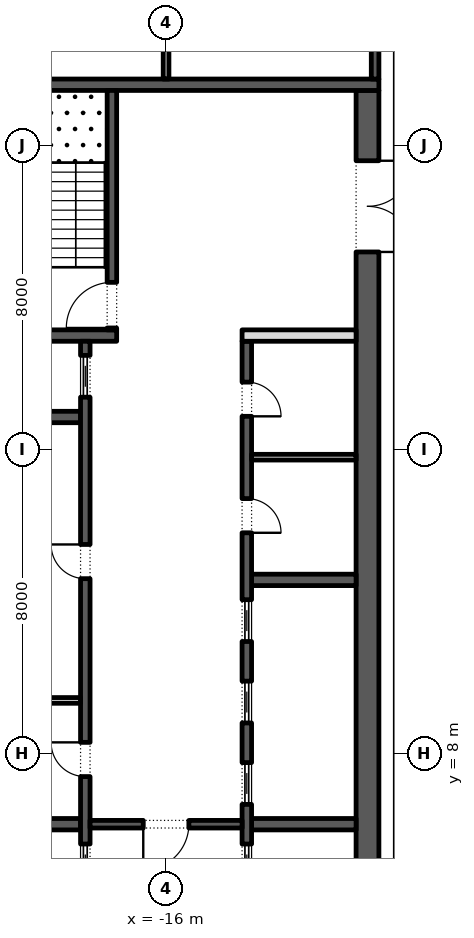
"""IFC4 building model, lengths in metres.
Left out: names, types, materials, properties, quantities, classifications, styles, units other than length and angle.
Written with IfcOpenShell. Run it as: python <this file> out.ifc"""

import sys

from ifc_helpers import new_model, si_unit, direction, frame, frame_2d, origin, place, context, subcontext, project, spatial, rectangle, extrude, element, fill, save


model = new_model("IFC4")
c1 = context("Model", 3, precision=1e-05, world=origin(), true_north=direction((0.0, 1.0)))
c2 = subcontext(c1, "Body", "Model", "MODEL_VIEW")
j1 = project(units=[si_unit("LENGTHUNIT", "METRE"), si_unit("PLANEANGLEUNIT", "RADIAN")], contexts=[c1])
p1 = place(None, origin())
s1 = spatial("IfcSite", under=j1, at=p1, CompositionType="ELEMENT")
p2 = place(p1, origin())
s2 = spatial("IfcBuilding", under=s1, at=p2, CompositionType="ELEMENT")
p3 = place(p2, frame((0.0, 0.0, 272.4)))
s3 = spatial("IfcBuildingStorey", under=s2, at=p3, CompositionType="ELEMENT", Elevation=272.4)
p4 = place(p3, frame((-10.7, -2.45, 0.0), z_axis=(0.0, 0.0, 1.0), x_axis=(0.0, 1.0, 0.0)))
e1 = element("IfcWall", 1, at=p4, inside=s3, PredefinedType="SHEAR", context=c2, shape_type="SweptSolid", body=[
    extrude(rectangle(XDim=27.9, YDim=0.6, at=frame_2d((13.95, 0.0))), origin(), (0.0, 0.0, 1.0), 4.0),
])
p5 = place(p4, frame((23.65, 0.0, 0.0)))
e2 = element("IfcOpeningElement", 2, at=p5, cuts=e1, PredefinedType="OPENING", context=c2, shape_type="SweptSolid", body=[
    extrude(rectangle(XDim=2.4, YDim=2.1, at=frame_2d((1.2, 1.05))), frame((0.0, 0.31, 0.0), z_axis=(0.0, -1.0, 0.0), x_axis=(1.0, 0.0, 0.0)), (0.0, 0.0, 1.0), 0.62),
])
p6 = place(p4, frame((1.087, 0.0, 0.0)))
e3 = element("IfcOpeningElement", 3, at=p6, cuts=e1, PredefinedType="OPENING", context=c2, shape_type="SweptSolid", body=[
    extrude(rectangle(XDim=0.9, YDim=2.1, at=frame_2d((0.45, 1.05))), frame((0.0, 0.31, 0.0), z_axis=(0.0, -1.0, 0.0), x_axis=(1.0, 0.0, 0.0)), (0.0, 0.0, 1.0), 0.62),
])
p7 = place(p4, frame((4.262, 0.0, 0.0)))
e4 = element("IfcOpeningElement", 4, at=p7, cuts=e1, PredefinedType="OPENING", context=c2, shape_type="SweptSolid", body=[
    extrude(rectangle(XDim=1.0, YDim=2.1, at=frame_2d((0.5, 1.05))), frame((0.0, 0.31, 0.0), z_axis=(0.0, -1.0, 0.0), x_axis=(1.0, 0.0, 0.0)), (0.0, 0.0, 1.0), 0.62),
])
p8 = place(p3, frame((-21.6, 25.6, 0.0), z_axis=(0.0, 0.0, 1.0), x_axis=(1.0, 0.0, 0.0)))
e5 = element("IfcWall", 5, at=p8, inside=s3, PredefinedType="SHEAR", context=c2, shape_type="SweptSolid", body=[
    extrude(rectangle(XDim=11.2, YDim=0.3, at=frame_2d((5.6, 0.0))), origin(), (0.0, 0.0, 1.0), 4.0),
])
p9 = place(p3, frame((-21.0, 19.0, 0.0), z_axis=(0.0, 0.0, 1.0), x_axis=(1.0, 0.0, 0.0)))
e6 = element("IfcWall", 6, at=p9, inside=s3, PredefinedType="SHEAR", context=c2, shape_type="SweptSolid", body=[
    extrude(rectangle(XDim=3.7, YDim=0.3, at=frame_2d((1.85, 0.0))), origin(), (0.0, 0.0, 1.0), 4.0),
])
p10 = place(p3, frame((-17.425, 19.15, 0.0), z_axis=(0.0, 0.0, 1.0), x_axis=(0.0, 1.0, 0.0)))
e7 = element("IfcWall", 7, at=p10, inside=s3, PredefinedType="SHEAR", context=c2, shape_type="SweptSolid", body=[
    extrude(rectangle(XDim=6.3, YDim=0.25, at=frame_2d((3.15, 0.0))), origin(), (0.0, 0.0, 1.0), 4.0),
])
p11 = place(p10, frame((0.05, 0.0, 0.0)))
e8 = element("IfcOpeningElement", 8, at=p11, cuts=e7, PredefinedType="OPENING", context=c2, shape_type="SweptSolid", body=[
    extrude(rectangle(XDim=1.2, YDim=2.1, at=frame_2d((0.6, 1.05))), frame((0.0, 0.135, 0.0), z_axis=(0.0, -1.0, 0.0), x_axis=(1.0, 0.0, 0.0)), (0.0, 0.0, 1.0), 0.27),
])
for number, where, z_axis, x_axis in (
    (9, (-21.0, 6.143, 0.0), (0.0, 0.0, 1.0), (1.0, 0.0, 0.0)),
    (10, (-21.0, 16.857, 0.0), (0.0, 0.0, 1.0), (1.0, 0.0, 0.0)),
):
    element("IfcWall", number, at=place(p3, frame(where, z_axis=z_axis, x_axis=x_axis)), inside=s3, PredefinedType="SHEAR", context=c2, shape_type="SweptSolid", body=[
        extrude(rectangle(XDim=2.75, YDim=0.3, at=frame_2d((1.375, 0.0))), origin(), (0.0, 0.0, 1.0), 4.0),
    ])
p12 = place(p3, frame((-18.125, 4.15, 0.0), z_axis=(0.0, 0.0, 1.0), x_axis=(0.0, 1.0, 0.0)))
e11 = element("IfcWall", 11, at=p12, inside=s3, PredefinedType="SHEAR", context=c2, shape_type="SweptSolid", body=[
    extrude(rectangle(XDim=14.7, YDim=0.25, at=frame_2d((7.35, 0.0))), origin(), (0.0, 0.0, 1.0), 4.0),
])
p13 = place(p12, frame((3.246, 0.0, 0.0)))
e12 = element("IfcOpeningElement", 12, at=p13, cuts=e11, PredefinedType="OPENING", context=c2, shape_type="SweptSolid", body=[
    extrude(rectangle(XDim=0.9, YDim=2.1, at=frame_2d((0.45, 1.05))), frame((0.0, 0.135, 0.0), z_axis=(0.0, -1.0, 0.0), x_axis=(1.0, 0.0, 0.0)), (0.0, 0.0, 1.0), 0.27),
])
p14 = place(p12, frame((8.454, 0.0, 0.0)))
e13 = element("IfcOpeningElement", 13, at=p14, cuts=e11, PredefinedType="OPENING", context=c2, shape_type="SweptSolid", body=[
    extrude(rectangle(XDim=0.9, YDim=2.1, at=frame_2d((0.45, 1.05))), frame((0.0, 0.135, 0.0), z_axis=(0.0, -1.0, 0.0), x_axis=(1.0, 0.0, 0.0)), (0.0, 0.0, 1.0), 0.27),
])
p15 = place(p12, frame((0.371, 0.0, 0.0)))
e14 = element("IfcOpeningElement", 14, at=p15, cuts=e11, PredefinedType="OPENING", context=c2, shape_type="SweptSolid", body=[
    extrude(rectangle(XDim=1.1, YDim=2.1, at=frame_2d((0.55, 1.05))), frame((0.0, 0.135, 0.0), z_axis=(0.0, -1.0, 0.0), x_axis=(1.0, 0.0, 0.0)), (0.0, 0.0, 1.0), 0.27),
])
p16 = place(p12, frame((13.229, 0.0, 0.0)))
e15 = element("IfcOpeningElement", 15, at=p16, cuts=e11, PredefinedType="OPENING", context=c2, shape_type="SweptSolid", body=[
    extrude(rectangle(XDim=1.1, YDim=2.1, at=frame_2d((0.55, 1.05))), frame((0.0, 0.135, 0.0), z_axis=(0.0, -1.0, 0.0), x_axis=(1.0, 0.0, 0.0)), (0.0, 0.0, 1.0), 0.27),
])
p17 = place(p3, frame((-21.0, 9.4, 0.0), z_axis=(0.0, 0.0, 1.0), x_axis=(1.0, 0.0, 0.0)))
e16 = element("IfcWall", 16, at=p17, inside=s3, PredefinedType="PARTITIONING", context=c2, shape_type="SweptSolid", body=[
    extrude(rectangle(XDim=2.75, YDim=0.15, at=frame_2d((1.375, 0.0))), origin(), (0.0, 0.0, 1.0), 4.0),
])
for number, where, z_axis, x_axis in (
    (17, (-13.75, 6.143, 0.0), (0.0, 0.0, 1.0), (1.0, 0.0, 0.0)),
    (18, (-13.75, 12.571, 0.0), (0.0, 0.0, 1.0), (1.0, 0.0, 0.0)),
):
    element("IfcWall", number, at=place(p3, frame(where, z_axis=z_axis, x_axis=x_axis)), inside=s3, PredefinedType="SHEAR", context=c2, shape_type="SweptSolid", body=[
        extrude(rectangle(XDim=2.75, YDim=0.3, at=frame_2d((1.375, 0.0))), origin(), (0.0, 0.0, 1.0), 4.0),
    ])
p18 = place(p3, frame((-13.875, -2.45, 0.0), z_axis=(0.0, 0.0, 1.0), x_axis=(0.0, 1.0, 0.0)))
e19 = element("IfcWall", 19, at=p18, inside=s3, PredefinedType="SHEAR", context=c2, shape_type="SweptSolid", body=[
    extrude(rectangle(XDim=21.3, YDim=0.25, at=frame_2d((10.65, 0.0))), origin(), (0.0, 0.0, 1.0), 4.0),
])
p19 = place(p18, frame((16.261, 0.0, 0.0)))
e20 = element("IfcOpeningElement", 20, at=p19, cuts=e19, PredefinedType="OPENING", context=c2, shape_type="SweptSolid", body=[
    extrude(rectangle(XDim=0.9, YDim=2.1, at=frame_2d((0.45, 1.05))), frame((0.0, 0.135, 0.0), z_axis=(0.0, -1.0, 0.0), x_axis=(1.0, 0.0, 0.0)), (0.0, 0.0, 1.0), 0.27),
])
p20 = place(p18, frame((19.325, 0.0, 0.0)))
e21 = element("IfcOpeningElement", 21, at=p20, cuts=e19, PredefinedType="OPENING", context=c2, shape_type="SweptSolid", body=[
    extrude(rectangle(XDim=0.9, YDim=2.1, at=frame_2d((0.45, 1.05))), frame((0.0, 0.135, 0.0), z_axis=(0.0, -1.0, 0.0), x_axis=(1.0, 0.0, 0.0)), (0.0, 0.0, 1.0), 0.27),
])
p21 = place(p18, frame((6.971, 0.0, 0.0)))
e22 = element("IfcOpeningElement", 22, at=p21, cuts=e19, PredefinedType="OPENING", context=c2, shape_type="SweptSolid", body=[
    extrude(rectangle(XDim=1.1, YDim=2.1, at=frame_2d((0.55, 1.05))), frame((0.0, 0.135, 0.0), z_axis=(0.0, -1.0, 0.0), x_axis=(1.0, 0.0, 0.0)), (0.0, 0.0, 1.0), 0.27),
])
p22 = place(p18, frame((9.114, 0.0, 0.0)))
e23 = element("IfcOpeningElement", 23, at=p22, cuts=e19, PredefinedType="OPENING", context=c2, shape_type="SweptSolid", body=[
    extrude(rectangle(XDim=1.1, YDim=2.1, at=frame_2d((0.55, 1.05))), frame((0.0, 0.135, 0.0), z_axis=(0.0, -1.0, 0.0), x_axis=(1.0, 0.0, 0.0)), (0.0, 0.0, 1.0), 0.27),
])
p23 = place(p18, frame((11.257, 0.0, 0.0)))
e24 = element("IfcOpeningElement", 24, at=p23, cuts=e19, PredefinedType="OPENING", context=c2, shape_type="SweptSolid", body=[
    extrude(rectangle(XDim=1.1, YDim=2.1, at=frame_2d((0.55, 1.05))), frame((0.0, 0.135, 0.0), z_axis=(0.0, -1.0, 0.0), x_axis=(1.0, 0.0, 0.0)), (0.0, 0.0, 1.0), 0.27),
])
p24 = place(p18, frame((13.4, 0.0, 0.0)))
e25 = element("IfcOpeningElement", 25, at=p24, cuts=e19, PredefinedType="OPENING", context=c2, shape_type="SweptSolid", body=[
    extrude(rectangle(XDim=1.1, YDim=2.1, at=frame_2d((0.55, 1.05))), frame((0.0, 0.135, 0.0), z_axis=(0.0, -1.0, 0.0), x_axis=(1.0, 0.0, 0.0)), (0.0, 0.0, 1.0), 0.27),
])
p25 = place(p3, frame((-14.0, 19.0, 0.0), z_axis=(0.0, 0.0, 1.0), x_axis=(1.0, 0.0, 0.0)))
e26 = element("IfcWall", 26, at=p25, inside=s3, PredefinedType="PARTITIONING", context=c2, shape_type="SweptSolid", body=[
    extrude(rectangle(XDim=3.0, YDim=0.3, at=frame_2d((1.5, 0.0))), origin(), (0.0, 0.0, 1.0), 4.0),
])
p26 = place(p3, frame((-13.75, 15.8, 0.0), z_axis=(0.0, 0.0, 1.0), x_axis=(1.0, 0.0, 0.0)))
e27 = element("IfcWall", 27, at=p26, inside=s3, PredefinedType="PARTITIONING", context=c2, shape_type="SweptSolid", body=[
    extrude(rectangle(XDim=2.75, YDim=0.15, at=frame_2d((1.375, 0.0))), origin(), (0.0, 0.0, 1.0), 4.0),
])
p27 = place(p3, frame((-18.0, 6.143, 0.0), z_axis=(0.0, 0.0, 1.0), x_axis=(1.0, 0.0, 0.0)))
e28 = element("IfcWall", 28, at=p27, inside=s3, PredefinedType="SHEAR", context=c2, shape_type="SweptSolid", body=[
    extrude(rectangle(XDim=4.0, YDim=0.2, at=frame_2d((2.0, 0.0))), origin(), (0.0, 0.0, 1.0), 4.0),
])
p28 = place(p27, frame((1.4, 0.0, 0.0)))
e29 = element("IfcOpeningElement", 29, at=p28, cuts=e28, PredefinedType="OPENING", context=c2, shape_type="SweptSolid", body=[
    extrude(rectangle(XDim=1.2, YDim=2.1, at=frame_2d((0.6, 1.05))), frame((0.0, 0.11, 0.0), z_axis=(0.0, -1.0, 0.0), x_axis=(1.0, 0.0, 0.0)), (0.0, 0.0, 1.0), 0.22),
])
p29 = place(p3, frame((-10.5, 25.75, 0.0), z_axis=(0.0, 0.0, 1.0), x_axis=(0.0, 1.0, 0.0)))
e30 = element("IfcWall", 30, at=p29, inside=s3, PredefinedType="SHEAR", context=c2, shape_type="SweptSolid", body=[
    extrude(rectangle(XDim=4.75, YDim=0.2, at=frame_2d((2.375, 0.0))), origin(), (0.0, 0.0, 1.0), 4.0),
])
p30 = place(p29, frame((1.925, 0.0, 0.0)))
e31 = element("IfcOpeningElement", 31, at=p30, cuts=e30, PredefinedType="OPENING", context=c2, shape_type="SweptSolid", body=[
    extrude(rectangle(XDim=0.9, YDim=2.1, at=frame_2d((0.45, 1.05))), frame((0.0, 0.11, 0.0), z_axis=(0.0, -1.0, 0.0), x_axis=(1.0, 0.0, 0.0)), (0.0, 0.0, 1.0), 0.22),
])
p31 = place(p3, frame((-16.0, 25.75, 0.0), z_axis=(0.0, 0.0, 1.0), x_axis=(0.0, 1.0, 0.0)))
e32 = element("IfcWall", 32, at=p31, inside=s3, PredefinedType="PARTITIONING", context=c2, shape_type="SweptSolid", body=[
    extrude(rectangle(XDim=4.75, YDim=0.15, at=frame_2d((2.375, 0.0))), origin(), (0.0, 0.0, 1.0), 4.0),
])
p32 = place(p13, origin())
e33 = element("IfcDoor", 33, at=p32, inside=s3, OperationType="SINGLE_SWING_LEFT", PredefinedType="DOOR", context=c2, shape_type="SweptSolid", body=[
    extrude(rectangle(XDim=0.9, YDim=2.1, at=frame_2d((0.45, 1.05))), frame((0.0, 0.125, 0.0), z_axis=(0.0, -1.0, 0.0), x_axis=(1.0, 0.0, 0.0)), (0.0, 0.0, 1.0), 0.05),
])
fill(e12, e33)
p33 = place(p14, origin())
e34 = element("IfcDoor", 34, at=p33, inside=s3, OperationType="SINGLE_SWING_LEFT", PredefinedType="DOOR", context=c2, shape_type="SweptSolid", body=[
    extrude(rectangle(XDim=0.9, YDim=2.1, at=frame_2d((0.45, 1.05))), frame((0.0, 0.125, 0.0), z_axis=(0.0, -1.0, 0.0), x_axis=(1.0, 0.0, 0.0)), (0.0, 0.0, 1.0), 0.05),
])
fill(e13, e34)
p34 = place(p15, origin())
e35 = element("IfcDoor", 35, at=p34, inside=s3, OperationType="SLIDING_TO_LEFT", PredefinedType="DOOR", context=c2, shape_type="SweptSolid", body=[
    extrude(rectangle(XDim=1.1, YDim=2.1, at=frame_2d((0.55, 1.05))), frame((0.0, 0.025, 0.0), z_axis=(0.0, -1.0, 0.0), x_axis=(1.0, 0.0, 0.0)), (0.0, 0.0, 1.0), 0.05),
])
fill(e14, e35)
p35 = place(p16, origin())
e36 = element("IfcDoor", 36, at=p35, inside=s3, OperationType="SLIDING_TO_LEFT", PredefinedType="DOOR", context=c2, shape_type="SweptSolid", body=[
    extrude(rectangle(XDim=1.1, YDim=2.1, at=frame_2d((0.55, 1.05))), frame((0.0, 0.025, 0.0), z_axis=(0.0, -1.0, 0.0), x_axis=(1.0, 0.0, 0.0)), (0.0, 0.0, 1.0), 0.05),
])
fill(e15, e36)
p36 = place(p19, frame((0.9, -0.2, 0.0), z_axis=(0.0, 0.0, 1.0), x_axis=(-1.0, 0.0, 0.0)))
e37 = element("IfcDoor", 37, at=p36, inside=s3, OperationType="SINGLE_SWING_LEFT", PredefinedType="DOOR", context=c2, shape_type="SweptSolid", body=[
    extrude(rectangle(XDim=0.9, YDim=2.1, at=frame_2d((0.45, 1.05))), frame((0.0, -0.075, 0.0), z_axis=(0.0, -1.0, 0.0), x_axis=(1.0, 0.0, 0.0)), (0.0, 0.0, 1.0), 0.05),
])
fill(e20, e37)
p37 = place(p20, frame((0.9, -0.2, 0.0), z_axis=(0.0, 0.0, 1.0), x_axis=(-1.0, 0.0, 0.0)))
e38 = element("IfcDoor", 38, at=p37, inside=s3, OperationType="SINGLE_SWING_LEFT", PredefinedType="DOOR", context=c2, shape_type="SweptSolid", body=[
    extrude(rectangle(XDim=0.9, YDim=2.1, at=frame_2d((0.45, 1.05))), frame((0.0, -0.075, 0.0), z_axis=(0.0, -1.0, 0.0), x_axis=(1.0, 0.0, 0.0)), (0.0, 0.0, 1.0), 0.05),
])
fill(e21, e38)
p38 = place(p21, origin())
e39 = element("IfcDoor", 39, at=p38, inside=s3, OperationType="SLIDING_TO_LEFT", PredefinedType="DOOR", context=c2, shape_type="SweptSolid", body=[
    extrude(rectangle(XDim=1.1, YDim=2.1, at=frame_2d((0.55, 1.05))), frame((0.0, 0.025, 0.0), z_axis=(0.0, -1.0, 0.0), x_axis=(1.0, 0.0, 0.0)), (0.0, 0.0, 1.0), 0.05),
])
fill(e22, e39)
p39 = place(p22, origin())
e40 = element("IfcDoor", 40, at=p39, inside=s3, OperationType="SLIDING_TO_LEFT", PredefinedType="DOOR", context=c2, shape_type="SweptSolid", body=[
    extrude(rectangle(XDim=1.1, YDim=2.1, at=frame_2d((0.55, 1.05))), frame((0.0, 0.025, 0.0), z_axis=(0.0, -1.0, 0.0), x_axis=(1.0, 0.0, 0.0)), (0.0, 0.0, 1.0), 0.05),
])
fill(e23, e40)
p40 = place(p23, origin())
e41 = element("IfcDoor", 41, at=p40, inside=s3, OperationType="SLIDING_TO_LEFT", PredefinedType="DOOR", context=c2, shape_type="SweptSolid", body=[
    extrude(rectangle(XDim=1.1, YDim=2.1, at=frame_2d((0.55, 1.05))), frame((0.0, 0.025, 0.0), z_axis=(0.0, -1.0, 0.0), x_axis=(1.0, 0.0, 0.0)), (0.0, 0.0, 1.0), 0.05),
])
fill(e24, e41)
p41 = place(p24, origin())
e42 = element("IfcDoor", 42, at=p41, inside=s3, OperationType="SLIDING_TO_LEFT", PredefinedType="DOOR", context=c2, shape_type="SweptSolid", body=[
    extrude(rectangle(XDim=1.1, YDim=2.1, at=frame_2d((0.55, 1.05))), frame((0.0, 0.025, 0.0), z_axis=(0.0, -1.0, 0.0), x_axis=(1.0, 0.0, 0.0)), (0.0, 0.0, 1.0), 0.05),
])
fill(e25, e42)
p42 = place(p28, frame((1.2, 0.0, 0.0), z_axis=(0.0, 0.0, 1.0), x_axis=(-1.0, 0.0, 0.0)))
e43 = element("IfcDoor", 43, at=p42, inside=s3, OperationType="SINGLE_SWING_LEFT", PredefinedType="DOOR", context=c2, shape_type="SweptSolid", body=[
    extrude(rectangle(XDim=1.2, YDim=2.1, at=frame_2d((0.6, 1.05))), frame((0.0, 0.025, 0.0), z_axis=(0.0, -1.0, 0.0), x_axis=(1.0, 0.0, 0.0)), (0.0, 0.0, 1.0), 0.05),
])
fill(e29, e43)
p43 = place(p5, frame((2.4, 0.0, 0.0), z_axis=(0.0, 0.0, 1.0), x_axis=(-1.0, 0.0, 0.0)))
e44 = element("IfcDoor", 44, at=p43, inside=s3, OperationType="DOUBLE_DOOR_SINGLE_SWING", PredefinedType="DOOR", context=c2, shape_type="SweptSolid", body=[
    extrude(rectangle(XDim=2.4, YDim=2.1, at=frame_2d((1.2, 1.05))), frame((0.0, 0.025, 0.0), z_axis=(0.0, -1.0, 0.0), x_axis=(1.0, 0.0, 0.0)), (0.0, 0.0, 1.0), 0.05),
])
fill(e2, e44)
p44 = place(p11, origin())
e45 = element("IfcDoor", 45, at=p44, inside=s3, OperationType="SINGLE_SWING_RIGHT", PredefinedType="DOOR", context=c2, shape_type="SweptSolid", body=[
    extrude(rectangle(XDim=1.2, YDim=2.1, at=frame_2d((0.6, 1.05))), frame((0.0, 0.025, 0.0), z_axis=(0.0, -1.0, 0.0), x_axis=(1.0, 0.0, 0.0)), (0.0, 0.0, 1.0), 0.05),
])
fill(e8, e45)
save(model, sys.argv[1])
